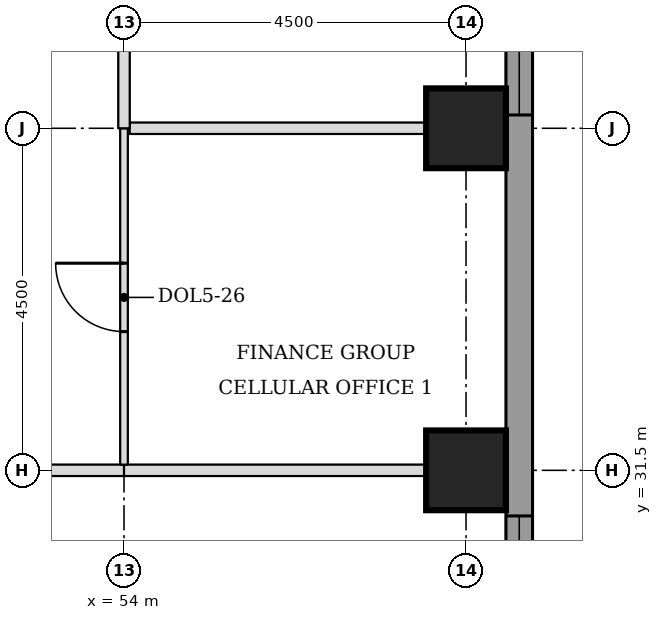
"""IFC4 building model, lengths in metres.
Left out: names, types, materials, properties, quantities, classifications, styles, units other than length and angle.
Written with IfcOpenShell. Run it as: python <this file> out.ifc"""

import sys

from ifc_helpers import new_model, si_unit, direction, frame, frame_2d, origin, origin_2d, place, context, subcontext, project, spatial, rectangle, extrude, element, fill, save


model = new_model("IFC4")
c1 = context("Model", 3, precision=1e-05, world=origin(), true_north=direction((0.0, 1.0)))
c2 = subcontext(c1, "Body", "Model", "MODEL_VIEW")
j1 = project(units=[si_unit("LENGTHUNIT", "METRE"), si_unit("PLANEANGLEUNIT", "RADIAN")], contexts=[c1])
p1 = place(None, origin())
s1 = spatial("IfcSite", under=j1, at=p1, CompositionType="ELEMENT")
p2 = place(p1, origin())
s2 = spatial("IfcBuilding", under=s1, at=p2, CompositionType="ELEMENT")
p3 = place(p2, frame((0.0, 0.0, 108.5)))
s3 = spatial("IfcBuildingStorey", under=s2, at=p3, CompositionType="ELEMENT", Elevation=108.5)
for number, where, z_axis, x_axis in (
    (1, (58.5, 31.5, 0.0), (0.0, 0.0, 1.0), (1.0, 0.0, 0.0)),
    (2, (58.5, 36.0, 0.0), (0.0, 0.0, 1.0), (1.0, 0.0, 0.0)),
):
    element("IfcColumn", number, at=place(p3, frame(where, z_axis=z_axis, x_axis=x_axis)), inside=s3, PredefinedType="COLUMN", context=c2, shape_type="SweptSolid", body=[
        extrude(rectangle(XDim=1.05, YDim=1.05, at=origin_2d()), origin(), (0.0, 0.0, 1.0), 3.7),
    ])
p4 = place(p3, frame((59.2, 22.138, 0.0), z_axis=(0.0, 0.0, 1.0), x_axis=(0.0, 1.0, 0.0)))
e3 = element("IfcWall", 3, at=p4, inside=s3, PredefinedType="STANDARD", context=c2, shape_type="SweptSolid", body=[
    extrude(rectangle(XDim=17.837, YDim=0.35, at=frame_2d((8.919, 0.0))), origin(), (0.0, 0.0, 1.0), 3.525),
])
p5 = place(p4, frame((5.462, 0.0, 0.9)))
e4 = element("IfcOpeningElement", 4, at=p5, cuts=e3, PredefinedType="OPENING", context=c2, shape_type="SweptSolid", body=[
    extrude(rectangle(XDim=3.3, YDim=1.9, at=frame_2d((1.65, 0.95))), frame((0.0, 0.185, 0.0), z_axis=(0.0, -1.0, 0.0), x_axis=(1.0, 0.0, 0.0)), (0.0, 0.0, 1.0), 0.37),
])
p6 = place(p4, frame((14.037, 0.0, 0.9)))
e5 = element("IfcOpeningElement", 5, at=p6, cuts=e3, PredefinedType="OPENING", context=c2, shape_type="SweptSolid", body=[
    extrude(rectangle(XDim=3.3, YDim=1.9, at=frame_2d((1.65, 0.95))), frame((0.0, 0.185, 0.0), z_axis=(0.0, -1.0, 0.0), x_axis=(1.0, 0.0, 0.0)), (0.0, 0.0, 1.0), 0.37),
])
p7 = place(p3, frame((49.5, 31.5, 0.0), z_axis=(0.0, 0.0, 1.0), x_axis=(1.0, 0.0, 0.0)))
e6 = element("IfcWall", 6, at=p7, inside=s3, PredefinedType="PARTITIONING", context=c2, shape_type="SweptSolid", body=[
    extrude(rectangle(XDim=4.5, YDim=0.15, at=frame_2d((2.25, 0.0))), origin(), (0.0, 0.0, 1.0), 2.55),
])
p8 = place(p7, frame((1.75, 0.0, 0.0)))
e7 = element("IfcOpeningElement", 7, at=p8, cuts=e6, PredefinedType="OPENING", context=c2, shape_type="SweptSolid", body=[
    extrude(rectangle(XDim=1.0, YDim=2.1, at=frame_2d((0.5, 1.05))), frame((0.0, 0.085, 0.0), z_axis=(0.0, -1.0, 0.0), x_axis=(1.0, 0.0, 0.0)), (0.0, 0.0, 1.0), 0.17),
])
p9 = place(p3, frame((54.0, 31.5, 0.0), z_axis=(0.0, 0.0, 1.0), x_axis=(1.0, 0.0, 0.0)))
e8 = element("IfcWall", 8, at=p9, inside=s3, PredefinedType="PARTITIONING", context=c2, shape_type="SweptSolid", body=[
    extrude(rectangle(XDim=5.025, YDim=0.15, at=frame_2d((2.512, 0.0))), origin(), (0.0, 0.0, 1.0), 2.55),
])
p10 = place(p3, frame((54.075, 36.0, 0.0), z_axis=(0.0, 0.0, 1.0), x_axis=(1.0, 0.0, 0.0)))
e9 = element("IfcWall", 9, at=p10, inside=s3, PredefinedType="PARTITIONING", context=c2, shape_type="SweptSolid", body=[
    extrude(rectangle(XDim=4.95, YDim=0.15, at=frame_2d((2.475, 0.0))), origin(), (0.0, 0.0, 1.0), 3.096),
])
p11 = place(p3, frame((54.0, 31.575, 0.0), z_axis=(0.0, 0.0, 1.0), x_axis=(0.0, 1.0, 0.0)))
e10 = element("IfcWall", 10, at=p11, inside=s3, PredefinedType="PARTITIONING", context=c2, shape_type="SweptSolid", body=[
    extrude(rectangle(XDim=4.425, YDim=0.1, at=frame_2d((2.212, 0.0))), origin(), (0.0, 0.0, 1.0), 3.55),
])
p12 = place(p11, frame((1.75, 0.0, 0.0)))
e11 = element("IfcOpeningElement", 11, at=p12, cuts=e10, PredefinedType="OPENING", context=c2, shape_type="SweptSolid", body=[
    extrude(rectangle(XDim=0.9, YDim=2.1, at=frame_2d((0.45, 1.05))), frame((0.0, 0.06, 0.0), z_axis=(0.0, -1.0, 0.0), x_axis=(1.0, 0.0, 0.0)), (0.0, 0.0, 1.0), 0.12),
])
p13 = place(p3, frame((54.0, 36.0, 0.0), z_axis=(0.0, 0.0, 1.0), x_axis=(0.0, 1.0, 0.0)))
e12 = element("IfcWall", 12, at=p13, inside=s3, PredefinedType="PARTITIONING", context=c2, shape_type="SweptSolid", body=[
    extrude(rectangle(XDim=3.975, YDim=0.15, at=frame_2d((1.988, 0.0))), origin(), (0.0, 0.0, 1.0), 3.55),
])
p14 = place(p13, frame((1.55, 0.0, 0.0)))
e13 = element("IfcOpeningElement", 13, at=p14, cuts=e12, PredefinedType="OPENING", context=c2, shape_type="SweptSolid", body=[
    extrude(rectangle(XDim=0.9, YDim=2.1, at=frame_2d((0.45, 1.05))), frame((0.0, 0.085, 0.0), z_axis=(0.0, -1.0, 0.0), x_axis=(1.0, 0.0, 0.0)), (0.0, 0.0, 1.0), 0.17),
])
p15 = place(p5, origin())
e14 = element("IfcWindow", 14, at=p15, inside=s3, PartitioningType="SINGLE_PANEL", PredefinedType="WINDOW", context=c2, shape_type="SweptSolid", body=[
    extrude(rectangle(XDim=3.3, YDim=1.9, at=frame_2d((1.65, 0.95))), frame((0.0, 0.085, 0.0), z_axis=(0.0, -1.0, 0.0), x_axis=(1.0, 0.0, 0.0)), (0.0, 0.0, 1.0), 0.06),
])
fill(e4, e14)
p16 = place(p6, origin())
e15 = element("IfcWindow", 15, at=p16, inside=s3, PartitioningType="SINGLE_PANEL", PredefinedType="WINDOW", context=c2, shape_type="SweptSolid", body=[
    extrude(rectangle(XDim=3.3, YDim=1.9, at=frame_2d((1.65, 0.95))), frame((0.0, 0.085, 0.0), z_axis=(0.0, -1.0, 0.0), x_axis=(1.0, 0.0, 0.0)), (0.0, 0.0, 1.0), 0.06),
])
fill(e5, e15)
p17 = place(p12, origin())
e16 = element("IfcDoor", 16, at=p17, inside=s3, OperationType="SINGLE_SWING_RIGHT", PredefinedType="DOOR", context=c2, shape_type="SweptSolid", body=[
    extrude(rectangle(XDim=0.9, YDim=2.1, at=frame_2d((0.45, 1.05))), frame((0.0, 0.025, 0.0), z_axis=(0.0, -1.0, 0.0), x_axis=(1.0, 0.0, 0.0)), (0.0, 0.0, 1.0), 0.05),
])
fill(e11, e16)
save(model, sys.argv[1])
